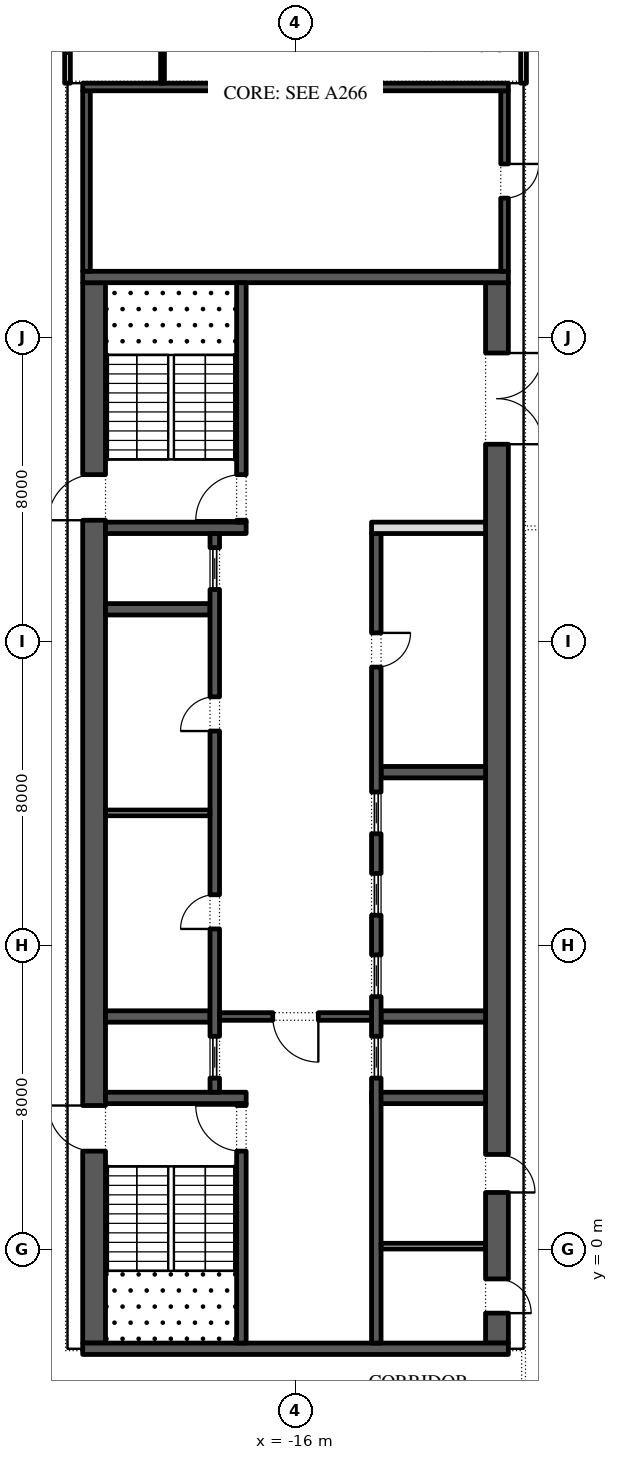
"""IFC4 building model, lengths in metres.
Left out: names, types, materials, properties, quantities, classifications, styles, units other than length and angle.
Written with IfcOpenShell. Run it as: python <this file> out.ifc"""

import sys

from ifc_helpers import new_model, si_unit, direction, frame, frame_2d, origin, place, context, subcontext, project, spatial, rectangle, extrude, element, fill, save


model = new_model("IFC4")
c1 = context("Model", 3, precision=1e-05, world=origin(), true_north=direction((0.0, 1.0)))
c2 = subcontext(c1, "Body", "Model", "MODEL_VIEW")
j1 = project(units=[si_unit("LENGTHUNIT", "METRE"), si_unit("PLANEANGLEUNIT", "RADIAN")], contexts=[c1])
p1 = place(None, origin())
s1 = spatial("IfcSite", under=j1, at=p1, CompositionType="ELEMENT")
p2 = place(p1, origin())
s2 = spatial("IfcBuilding", under=s1, at=p2, CompositionType="ELEMENT")
p3 = place(p2, frame((0.0, 0.0, 289.2)))
s3 = spatial("IfcBuildingStorey", under=s2, at=p3, CompositionType="ELEMENT", Elevation=289.2)
p4 = place(p3, frame((-21.3, -2.45, 0.0), z_axis=(0.0, 0.0, 1.0), x_axis=(0.0, 1.0, 0.0)))
e1 = element("IfcWall", 1, at=p4, inside=s3, PredefinedType="SHEAR", context=c2, shape_type="SweptSolid", body=[
    extrude(rectangle(XDim=27.9, YDim=0.6, at=frame_2d((13.95, 0.0))), origin(), (0.0, 0.0, 1.0), 3.95),
])
p5 = place(p4, frame((5.05, 0.0, 0.0)))
e2 = element("IfcOpeningElement", 2, at=p5, cuts=e1, PredefinedType="OPENING", context=c2, shape_type="SweptSolid", body=[
    extrude(rectangle(XDim=1.2, YDim=2.1, at=frame_2d((0.6, 1.05))), frame((0.0, 0.31, 0.0), z_axis=(0.0, -1.0, 0.0), x_axis=(1.0, 0.0, 0.0)), (0.0, 0.0, 1.0), 0.62),
])
p6 = place(p4, frame((21.65, 0.0, 0.0)))
e3 = element("IfcOpeningElement", 3, at=p6, cuts=e1, PredefinedType="OPENING", context=c2, shape_type="SweptSolid", body=[
    extrude(rectangle(XDim=1.2, YDim=2.1, at=frame_2d((0.6, 1.05))), frame((0.0, 0.31, 0.0), z_axis=(0.0, -1.0, 0.0), x_axis=(1.0, 0.0, 0.0)), (0.0, 0.0, 1.0), 0.62),
])
p7 = place(p3, frame((-10.7, -2.45, 0.0), z_axis=(0.0, 0.0, 1.0), x_axis=(0.0, 1.0, 0.0)))
e4 = element("IfcWall", 4, at=p7, inside=s3, PredefinedType="SHEAR", context=c2, shape_type="SweptSolid", body=[
    extrude(rectangle(XDim=27.9, YDim=0.6, at=frame_2d((13.95, 0.0))), origin(), (0.0, 0.0, 1.0), 3.95),
])
p8 = place(p7, frame((23.65, 0.0, 0.0)))
e5 = element("IfcOpeningElement", 5, at=p8, cuts=e4, PredefinedType="OPENING", context=c2, shape_type="SweptSolid", body=[
    extrude(rectangle(XDim=2.4, YDim=2.1, at=frame_2d((1.2, 1.05))), frame((0.0, 0.31, 0.0), z_axis=(0.0, -1.0, 0.0), x_axis=(1.0, 0.0, 0.0)), (0.0, 0.0, 1.0), 0.62),
])
p9 = place(p7, frame((0.788, 0.0, 0.0)))
e6 = element("IfcOpeningElement", 6, at=p9, cuts=e4, PredefinedType="OPENING", context=c2, shape_type="SweptSolid", body=[
    extrude(rectangle(XDim=0.9, YDim=2.1, at=frame_2d((0.45, 1.05))), frame((0.0, 0.31, 0.0), z_axis=(0.0, -1.0, 0.0), x_axis=(1.0, 0.0, 0.0)), (0.0, 0.0, 1.0), 0.62),
])
p10 = place(p7, frame((3.962, 0.0, 0.0)))
e7 = element("IfcOpeningElement", 7, at=p10, cuts=e4, PredefinedType="OPENING", context=c2, shape_type="SweptSolid", body=[
    extrude(rectangle(XDim=1.0, YDim=2.1, at=frame_2d((0.5, 1.05))), frame((0.0, 0.31, 0.0), z_axis=(0.0, -1.0, 0.0), x_axis=(1.0, 0.0, 0.0)), (0.0, 0.0, 1.0), 0.62),
])
for number, where, z_axis, x_axis in (
    (8, (-21.6, -2.6, 0.0), (0.0, 0.0, 1.0), (1.0, 0.0, 0.0)),
    (9, (-21.6, 25.6, 0.0), (0.0, 0.0, 1.0), (1.0, 0.0, 0.0)),
):
    element("IfcWall", number, at=place(p3, frame(where, z_axis=z_axis, x_axis=x_axis)), inside=s3, PredefinedType="SHEAR", context=c2, shape_type="SweptSolid", body=[
        extrude(rectangle(XDim=11.2, YDim=0.3, at=frame_2d((5.6, 0.0))), origin(), (0.0, 0.0, 1.0), 3.95),
    ])
p11 = place(p3, frame((-21.0, 4.0, 0.0), z_axis=(0.0, 0.0, 1.0), x_axis=(1.0, 0.0, 0.0)))
e10 = element("IfcWall", 10, at=p11, inside=s3, PredefinedType="SHEAR", context=c2, shape_type="SweptSolid", body=[
    extrude(rectangle(XDim=3.7, YDim=0.3, at=frame_2d((1.85, 0.0))), origin(), (0.0, 0.0, 1.0), 3.95),
])
p12 = place(p3, frame((-17.425, -2.45, 0.0), z_axis=(0.0, 0.0, 1.0), x_axis=(0.0, 1.0, 0.0)))
e11 = element("IfcWall", 11, at=p12, inside=s3, PredefinedType="SHEAR", context=c2, shape_type="SweptSolid", body=[
    extrude(rectangle(XDim=6.3, YDim=0.25, at=frame_2d((3.15, 0.0))), origin(), (0.0, 0.0, 1.0), 3.95),
])
p13 = place(p12, frame((5.05, 0.0, 0.0)))
e12 = element("IfcOpeningElement", 12, at=p13, cuts=e11, PredefinedType="OPENING", context=c2, shape_type="SweptSolid", body=[
    extrude(rectangle(XDim=1.2, YDim=2.1, at=frame_2d((0.6, 1.05))), frame((0.0, 0.135, 0.0), z_axis=(0.0, -1.0, 0.0), x_axis=(1.0, 0.0, 0.0)), (0.0, 0.0, 1.0), 0.27),
])
p14 = place(p3, frame((-21.0, 19.0, 0.0), z_axis=(0.0, 0.0, 1.0), x_axis=(1.0, 0.0, 0.0)))
e13 = element("IfcWall", 13, at=p14, inside=s3, PredefinedType="SHEAR", context=c2, shape_type="SweptSolid", body=[
    extrude(rectangle(XDim=3.7, YDim=0.3, at=frame_2d((1.85, 0.0))), origin(), (0.0, 0.0, 1.0), 3.95),
])
p15 = place(p3, frame((-17.425, 19.15, 0.0), z_axis=(0.0, 0.0, 1.0), x_axis=(0.0, 1.0, 0.0)))
e14 = element("IfcWall", 14, at=p15, inside=s3, PredefinedType="SHEAR", context=c2, shape_type="SweptSolid", body=[
    extrude(rectangle(XDim=6.3, YDim=0.25, at=frame_2d((3.15, 0.0))), origin(), (0.0, 0.0, 1.0), 3.95),
])
p16 = place(p15, frame((0.05, 0.0, 0.0)))
e15 = element("IfcOpeningElement", 15, at=p16, cuts=e14, PredefinedType="OPENING", context=c2, shape_type="SweptSolid", body=[
    extrude(rectangle(XDim=1.2, YDim=2.1, at=frame_2d((0.6, 1.05))), frame((0.0, 0.135, 0.0), z_axis=(0.0, -1.0, 0.0), x_axis=(1.0, 0.0, 0.0)), (0.0, 0.0, 1.0), 0.27),
])
for number, where, z_axis, x_axis in (
    (16, (-21.0, 6.143, 0.0), (0.0, 0.0, 1.0), (1.0, 0.0, 0.0)),
    (17, (-21.0, 16.857, 0.0), (0.0, 0.0, 1.0), (1.0, 0.0, 0.0)),
):
    element("IfcWall", number, at=place(p3, frame(where, z_axis=z_axis, x_axis=x_axis)), inside=s3, PredefinedType="SHEAR", context=c2, shape_type="SweptSolid", body=[
        extrude(rectangle(XDim=2.75, YDim=0.3, at=frame_2d((1.375, 0.0))), origin(), (0.0, 0.0, 1.0), 3.95),
    ])
p17 = place(p3, frame((-18.125, 4.15, 0.0), z_axis=(0.0, 0.0, 1.0), x_axis=(0.0, 1.0, 0.0)))
e18 = element("IfcWall", 18, at=p17, inside=s3, PredefinedType="SHEAR", context=c2, shape_type="SweptSolid", body=[
    extrude(rectangle(XDim=14.7, YDim=0.25, at=frame_2d((7.35, 0.0))), origin(), (0.0, 0.0, 1.0), 3.95),
])
p18 = place(p17, frame((4.296, 0.0, 0.0)))
e19 = element("IfcOpeningElement", 19, at=p18, cuts=e18, PredefinedType="OPENING", context=c2, shape_type="SweptSolid", body=[
    extrude(rectangle(XDim=0.9, YDim=2.1, at=frame_2d((0.45, 1.05))), frame((0.0, 0.135, 0.0), z_axis=(0.0, -1.0, 0.0), x_axis=(1.0, 0.0, 0.0)), (0.0, 0.0, 1.0), 0.27),
])
p19 = place(p17, frame((9.504, 0.0, 0.0)))
e20 = element("IfcOpeningElement", 20, at=p19, cuts=e18, PredefinedType="OPENING", context=c2, shape_type="SweptSolid", body=[
    extrude(rectangle(XDim=0.9, YDim=2.1, at=frame_2d((0.45, 1.05))), frame((0.0, 0.135, 0.0), z_axis=(0.0, -1.0, 0.0), x_axis=(1.0, 0.0, 0.0)), (0.0, 0.0, 1.0), 0.27),
])
p20 = place(p17, frame((0.371, 0.0, 0.0)))
e21 = element("IfcOpeningElement", 21, at=p20, cuts=e18, PredefinedType="OPENING", context=c2, shape_type="SweptSolid", body=[
    extrude(rectangle(XDim=1.1, YDim=2.1, at=frame_2d((0.55, 1.05))), frame((0.0, 0.135, 0.0), z_axis=(0.0, -1.0, 0.0), x_axis=(1.0, 0.0, 0.0)), (0.0, 0.0, 1.0), 0.27),
])
p21 = place(p17, frame((13.229, 0.0, 0.0)))
e22 = element("IfcOpeningElement", 22, at=p21, cuts=e18, PredefinedType="OPENING", context=c2, shape_type="SweptSolid", body=[
    extrude(rectangle(XDim=1.1, YDim=2.1, at=frame_2d((0.55, 1.05))), frame((0.0, 0.135, 0.0), z_axis=(0.0, -1.0, 0.0), x_axis=(1.0, 0.0, 0.0)), (0.0, 0.0, 1.0), 0.27),
])
p22 = place(p3, frame((-21.0, 11.5, 0.0), z_axis=(0.0, 0.0, 1.0), x_axis=(1.0, 0.0, 0.0)))
e23 = element("IfcWall", 23, at=p22, inside=s3, PredefinedType="PARTITIONING", context=c2, shape_type="SweptSolid", body=[
    extrude(rectangle(XDim=2.75, YDim=0.15, at=frame_2d((1.375, 0.0))), origin(), (0.0, 0.0, 1.0), 3.95),
])
p23 = place(p3, frame((-14.0, 4.0, 0.0), z_axis=(0.0, 0.0, 1.0), x_axis=(1.0, 0.0, 0.0)))
e24 = element("IfcWall", 24, at=p23, inside=s3, PredefinedType="SHEAR", context=c2, shape_type="SweptSolid", body=[
    extrude(rectangle(XDim=3.0, YDim=0.3, at=frame_2d((1.5, 0.0))), origin(), (0.0, 0.0, 1.0), 3.95),
])
for number, where, z_axis, x_axis in (
    (25, (-13.75, 6.143, 0.0), (0.0, 0.0, 1.0), (1.0, 0.0, 0.0)),
    (26, (-13.75, 12.571, 0.0), (0.0, 0.0, 1.0), (1.0, 0.0, 0.0)),
):
    element("IfcWall", number, at=place(p3, frame(where, z_axis=z_axis, x_axis=x_axis)), inside=s3, PredefinedType="SHEAR", context=c2, shape_type="SweptSolid", body=[
        extrude(rectangle(XDim=2.75, YDim=0.3, at=frame_2d((1.375, 0.0))), origin(), (0.0, 0.0, 1.0), 3.95),
    ])
p24 = place(p3, frame((-13.875, -2.45, 0.0), z_axis=(0.0, 0.0, 1.0), x_axis=(0.0, 1.0, 0.0)))
e27 = element("IfcWall", 27, at=p24, inside=s3, PredefinedType="SHEAR", context=c2, shape_type="SweptSolid", body=[
    extrude(rectangle(XDim=21.3, YDim=0.25, at=frame_2d((10.65, 0.0))), origin(), (0.0, 0.0, 1.0), 3.95),
])
p25 = place(p24, frame((17.786, 0.0, 0.0)))
e28 = element("IfcOpeningElement", 28, at=p25, cuts=e27, PredefinedType="OPENING", context=c2, shape_type="SweptSolid", body=[
    extrude(rectangle(XDim=0.9, YDim=2.1, at=frame_2d((0.45, 1.05))), frame((0.0, 0.135, 0.0), z_axis=(0.0, -1.0, 0.0), x_axis=(1.0, 0.0, 0.0)), (0.0, 0.0, 1.0), 0.27),
])
p26 = place(p24, frame((6.971, 0.0, 0.0)))
e29 = element("IfcOpeningElement", 29, at=p26, cuts=e27, PredefinedType="OPENING", context=c2, shape_type="SweptSolid", body=[
    extrude(rectangle(XDim=1.1, YDim=2.1, at=frame_2d((0.55, 1.05))), frame((0.0, 0.135, 0.0), z_axis=(0.0, -1.0, 0.0), x_axis=(1.0, 0.0, 0.0)), (0.0, 0.0, 1.0), 0.27),
])
p27 = place(p24, frame((9.114, 0.0, 0.0)))
e30 = element("IfcOpeningElement", 30, at=p27, cuts=e27, PredefinedType="OPENING", context=c2, shape_type="SweptSolid", body=[
    extrude(rectangle(XDim=1.1, YDim=2.1, at=frame_2d((0.55, 1.05))), frame((0.0, 0.135, 0.0), z_axis=(0.0, -1.0, 0.0), x_axis=(1.0, 0.0, 0.0)), (0.0, 0.0, 1.0), 0.27),
])
p28 = place(p24, frame((11.257, 0.0, 0.0)))
e31 = element("IfcOpeningElement", 31, at=p28, cuts=e27, PredefinedType="OPENING", context=c2, shape_type="SweptSolid", body=[
    extrude(rectangle(XDim=1.1, YDim=2.1, at=frame_2d((0.55, 1.05))), frame((0.0, 0.135, 0.0), z_axis=(0.0, -1.0, 0.0), x_axis=(1.0, 0.0, 0.0)), (0.0, 0.0, 1.0), 0.27),
])
p29 = place(p24, frame((13.4, 0.0, 0.0)))
e32 = element("IfcOpeningElement", 32, at=p29, cuts=e27, PredefinedType="OPENING", context=c2, shape_type="SweptSolid", body=[
    extrude(rectangle(XDim=1.1, YDim=2.1, at=frame_2d((0.55, 1.05))), frame((0.0, 0.135, 0.0), z_axis=(0.0, -1.0, 0.0), x_axis=(1.0, 0.0, 0.0)), (0.0, 0.0, 1.0), 0.27),
])
p30 = place(p3, frame((-14.0, 19.0, 0.0), z_axis=(0.0, 0.0, 1.0), x_axis=(1.0, 0.0, 0.0)))
e33 = element("IfcWall", 33, at=p30, inside=s3, PredefinedType="PARTITIONING", context=c2, shape_type="SweptSolid", body=[
    extrude(rectangle(XDim=3.0, YDim=0.3, at=frame_2d((1.5, 0.0))), origin(), (0.0, 0.0, 1.0), 3.95),
])
p31 = place(p3, frame((-18.0, 6.143, 0.0), z_axis=(0.0, 0.0, 1.0), x_axis=(1.0, 0.0, 0.0)))
e34 = element("IfcWall", 34, at=p31, inside=s3, PredefinedType="SHEAR", context=c2, shape_type="SweptSolid", body=[
    extrude(rectangle(XDim=4.0, YDim=0.2, at=frame_2d((2.0, 0.0))), origin(), (0.0, 0.0, 1.0), 3.95),
])
p32 = place(p31, frame((1.4, 0.0, 0.0)))
e35 = element("IfcOpeningElement", 35, at=p32, cuts=e34, PredefinedType="OPENING", context=c2, shape_type="SweptSolid", body=[
    extrude(rectangle(XDim=1.2, YDim=2.1, at=frame_2d((0.6, 1.05))), frame((0.0, 0.11, 0.0), z_axis=(0.0, -1.0, 0.0), x_axis=(1.0, 0.0, 0.0)), (0.0, 0.0, 1.0), 0.22),
])
p33 = place(p3, frame((-13.75, 0.1, 0.0), z_axis=(0.0, 0.0, 1.0), x_axis=(1.0, 0.0, 0.0)))
e36 = element("IfcWall", 36, at=p33, inside=s3, PredefinedType="PARTITIONING", context=c2, shape_type="SweptSolid", body=[
    extrude(rectangle(XDim=2.75, YDim=0.15, at=frame_2d((1.375, 0.0))), origin(), (0.0, 0.0, 1.0), 3.95),
])
p34 = place(p3, frame((-21.5, 25.75, 0.0), z_axis=(0.0, 0.0, 1.0), x_axis=(0.0, 1.0, 0.0)))
e37 = element("IfcWall", 37, at=p34, inside=s3, PredefinedType="SHEAR", context=c2, shape_type="SweptSolid", body=[
    extrude(rectangle(XDim=4.75, YDim=0.2, at=frame_2d((2.375, 0.0))), origin(), (0.0, 0.0, 1.0), 3.95),
])
p35 = place(p3, frame((-10.5, 25.75, 0.0), z_axis=(0.0, 0.0, 1.0), x_axis=(0.0, 1.0, 0.0)))
e38 = element("IfcWall", 38, at=p35, inside=s3, PredefinedType="SHEAR", context=c2, shape_type="SweptSolid", body=[
    extrude(rectangle(XDim=4.75, YDim=0.2, at=frame_2d((2.375, 0.0))), origin(), (0.0, 0.0, 1.0), 3.95),
])
p36 = place(p35, frame((1.925, 0.0, 0.0)))
e39 = element("IfcOpeningElement", 39, at=p36, cuts=e38, PredefinedType="OPENING", context=c2, shape_type="SweptSolid", body=[
    extrude(rectangle(XDim=0.9, YDim=2.1, at=frame_2d((0.45, 1.05))), frame((0.0, 0.11, 0.0), z_axis=(0.0, -1.0, 0.0), x_axis=(1.0, 0.0, 0.0)), (0.0, 0.0, 1.0), 0.22),
])
p37 = place(p3, frame((-21.6, 30.6, 0.0), z_axis=(0.0, 0.0, 1.0), x_axis=(1.0, 0.0, 0.0)))
e40 = element("IfcWall", 40, at=p37, inside=s3, PredefinedType="SHEAR", context=c2, shape_type="SweptSolid", body=[
    extrude(rectangle(XDim=11.2, YDim=0.2, at=frame_2d((5.6, 0.0))), origin(), (0.0, 0.0, 1.0), 3.95),
])
p38 = place(p3, frame((-22.0, 32.425, 0.0), z_axis=(0.0, 0.0, 1.0), x_axis=(0.0, -1.0, 0.0)))
e41 = element("IfcWall", 41, at=p38, inside=s3, PredefinedType="PARTITIONING", context=c2, shape_type="SweptSolid", body=[
    extrude(rectangle(XDim=1.725, YDim=0.15, at=frame_2d((0.863, 0.0))), origin(), (0.0, 0.0, 1.0), 3.95),
])
p39 = place(p3, frame((-19.5, 41.95, 0.0), z_axis=(0.0, 0.0, 1.0), x_axis=(0.0, -1.0, 0.0)))
e42 = element("IfcWall", 42, at=p39, inside=s3, PredefinedType="PARTITIONING", context=c2, shape_type="SweptSolid", body=[
    extrude(rectangle(XDim=11.25, YDim=0.1, at=frame_2d((5.625, 0.0))), origin(), (0.0, 0.0, 1.0), 3.95),
])
p40 = place(p3, frame((-10.0, 30.7, 0.0), z_axis=(0.0, 0.0, 1.0), x_axis=(0.0, 1.0, 0.0)))
e43 = element("IfcWall", 43, at=p40, inside=s3, PredefinedType="PARTITIONING", context=c2, shape_type="SweptSolid", body=[
    extrude(rectangle(XDim=1.875, YDim=0.15, at=frame_2d((0.938, 0.0))), origin(), (0.0, 0.0, 1.0), 3.95),
])
p41 = place(p18, origin())
e44 = element("IfcDoor", 44, at=p41, inside=s3, OperationType="SINGLE_SWING_RIGHT", PredefinedType="DOOR", context=c2, shape_type="SweptSolid", body=[
    extrude(rectangle(XDim=0.9, YDim=2.1, at=frame_2d((0.45, 1.05))), frame((0.0, 0.125, 0.0), z_axis=(0.0, -1.0, 0.0), x_axis=(1.0, 0.0, 0.0)), (0.0, 0.0, 1.0), 0.05),
])
fill(e19, e44)
p42 = place(p19, origin())
e45 = element("IfcDoor", 45, at=p42, inside=s3, OperationType="SINGLE_SWING_RIGHT", PredefinedType="DOOR", context=c2, shape_type="SweptSolid", body=[
    extrude(rectangle(XDim=0.9, YDim=2.1, at=frame_2d((0.45, 1.05))), frame((0.0, 0.125, 0.0), z_axis=(0.0, -1.0, 0.0), x_axis=(1.0, 0.0, 0.0)), (0.0, 0.0, 1.0), 0.05),
])
fill(e20, e45)
p43 = place(p20, origin())
e46 = element("IfcDoor", 46, at=p43, inside=s3, OperationType="SLIDING_TO_LEFT", PredefinedType="DOOR", context=c2, shape_type="SweptSolid", body=[
    extrude(rectangle(XDim=1.1, YDim=2.1, at=frame_2d((0.55, 1.05))), frame((0.0, 0.025, 0.0), z_axis=(0.0, -1.0, 0.0), x_axis=(1.0, 0.0, 0.0)), (0.0, 0.0, 1.0), 0.05),
])
fill(e21, e46)
p44 = place(p21, origin())
e47 = element("IfcDoor", 47, at=p44, inside=s3, OperationType="SLIDING_TO_LEFT", PredefinedType="DOOR", context=c2, shape_type="SweptSolid", body=[
    extrude(rectangle(XDim=1.1, YDim=2.1, at=frame_2d((0.55, 1.05))), frame((0.0, 0.025, 0.0), z_axis=(0.0, -1.0, 0.0), x_axis=(1.0, 0.0, 0.0)), (0.0, 0.0, 1.0), 0.05),
])
fill(e22, e47)
p45 = place(p25, frame((0.9, -0.2, 0.0), z_axis=(0.0, 0.0, 1.0), x_axis=(-1.0, 0.0, 0.0)))
e48 = element("IfcDoor", 48, at=p45, inside=s3, OperationType="SINGLE_SWING_RIGHT", PredefinedType="DOOR", context=c2, shape_type="SweptSolid", body=[
    extrude(rectangle(XDim=0.9, YDim=2.1, at=frame_2d((0.45, 1.05))), frame((0.0, -0.075, 0.0), z_axis=(0.0, -1.0, 0.0), x_axis=(1.0, 0.0, 0.0)), (0.0, 0.0, 1.0), 0.05),
])
fill(e28, e48)
p46 = place(p26, origin())
e49 = element("IfcDoor", 49, at=p46, inside=s3, OperationType="SLIDING_TO_LEFT", PredefinedType="DOOR", context=c2, shape_type="SweptSolid", body=[
    extrude(rectangle(XDim=1.1, YDim=2.1, at=frame_2d((0.55, 1.05))), frame((0.0, 0.025, 0.0), z_axis=(0.0, -1.0, 0.0), x_axis=(1.0, 0.0, 0.0)), (0.0, 0.0, 1.0), 0.05),
])
fill(e29, e49)
p47 = place(p27, origin())
e50 = element("IfcDoor", 50, at=p47, inside=s3, OperationType="SLIDING_TO_LEFT", PredefinedType="DOOR", context=c2, shape_type="SweptSolid", body=[
    extrude(rectangle(XDim=1.1, YDim=2.1, at=frame_2d((0.55, 1.05))), frame((0.0, 0.025, 0.0), z_axis=(0.0, -1.0, 0.0), x_axis=(1.0, 0.0, 0.0)), (0.0, 0.0, 1.0), 0.05),
])
fill(e30, e50)
p48 = place(p28, origin())
e51 = element("IfcDoor", 51, at=p48, inside=s3, OperationType="SLIDING_TO_LEFT", PredefinedType="DOOR", context=c2, shape_type="SweptSolid", body=[
    extrude(rectangle(XDim=1.1, YDim=2.1, at=frame_2d((0.55, 1.05))), frame((0.0, 0.025, 0.0), z_axis=(0.0, -1.0, 0.0), x_axis=(1.0, 0.0, 0.0)), (0.0, 0.0, 1.0), 0.05),
])
fill(e31, e51)
p49 = place(p29, origin())
e52 = element("IfcDoor", 52, at=p49, inside=s3, OperationType="SLIDING_TO_LEFT", PredefinedType="DOOR", context=c2, shape_type="SweptSolid", body=[
    extrude(rectangle(XDim=1.1, YDim=2.1, at=frame_2d((0.55, 1.05))), frame((0.0, 0.025, 0.0), z_axis=(0.0, -1.0, 0.0), x_axis=(1.0, 0.0, 0.0)), (0.0, 0.0, 1.0), 0.05),
])
fill(e32, e52)
p50 = place(p32, frame((1.2, 0.0, 0.0), z_axis=(0.0, 0.0, 1.0), x_axis=(-1.0, 0.0, 0.0)))
e53 = element("IfcDoor", 53, at=p50, inside=s3, OperationType="SINGLE_SWING_RIGHT", PredefinedType="DOOR", context=c2, shape_type="SweptSolid", body=[
    extrude(rectangle(XDim=1.2, YDim=2.1, at=frame_2d((0.6, 1.05))), frame((0.0, 0.025, 0.0), z_axis=(0.0, -1.0, 0.0), x_axis=(1.0, 0.0, 0.0)), (0.0, 0.0, 1.0), 0.05),
])
fill(e35, e53)
p51 = place(p8, frame((2.4, 0.0, 0.0), z_axis=(0.0, 0.0, 1.0), x_axis=(-1.0, 0.0, 0.0)))
e54 = element("IfcDoor", 54, at=p51, inside=s3, OperationType="DOUBLE_DOOR_SINGLE_SWING", PredefinedType="DOOR", context=c2, shape_type="SweptSolid", body=[
    extrude(rectangle(XDim=2.4, YDim=2.1, at=frame_2d((1.2, 1.05))), frame((0.0, 0.025, 0.0), z_axis=(0.0, -1.0, 0.0), x_axis=(1.0, 0.0, 0.0)), (0.0, 0.0, 1.0), 0.05),
])
fill(e5, e54)
p52 = place(p13, origin())
e55 = element("IfcDoor", 55, at=p52, inside=s3, OperationType="SINGLE_SWING_LEFT", PredefinedType="DOOR", context=c2, shape_type="SweptSolid", body=[
    extrude(rectangle(XDim=1.2, YDim=2.1, at=frame_2d((0.6, 1.05))), frame((0.0, 0.025, 0.0), z_axis=(0.0, -1.0, 0.0), x_axis=(1.0, 0.0, 0.0)), (0.0, 0.0, 1.0), 0.05),
])
fill(e12, e55)
p53 = place(p5, origin())
e56 = element("IfcDoor", 56, at=p53, inside=s3, OperationType="SINGLE_SWING_LEFT", PredefinedType="DOOR", context=c2, shape_type="SweptSolid", body=[
    extrude(rectangle(XDim=1.2, YDim=2.1, at=frame_2d((0.6, 1.05))), frame((0.0, 0.025, 0.0), z_axis=(0.0, -1.0, 0.0), x_axis=(1.0, 0.0, 0.0)), (0.0, 0.0, 1.0), 0.05),
])
fill(e2, e56)
p54 = place(p16, origin())
e57 = element("IfcDoor", 57, at=p54, inside=s3, OperationType="SINGLE_SWING_RIGHT", PredefinedType="DOOR", context=c2, shape_type="SweptSolid", body=[
    extrude(rectangle(XDim=1.2, YDim=2.1, at=frame_2d((0.6, 1.05))), frame((0.0, 0.025, 0.0), z_axis=(0.0, -1.0, 0.0), x_axis=(1.0, 0.0, 0.0)), (0.0, 0.0, 1.0), 0.05),
])
fill(e15, e57)
p55 = place(p6, origin())
e58 = element("IfcDoor", 58, at=p55, inside=s3, OperationType="SINGLE_SWING_RIGHT", PredefinedType="DOOR", context=c2, shape_type="SweptSolid", body=[
    extrude(rectangle(XDim=1.2, YDim=2.1, at=frame_2d((0.6, 1.05))), frame((0.0, 0.025, 0.0), z_axis=(0.0, -1.0, 0.0), x_axis=(1.0, 0.0, 0.0)), (0.0, 0.0, 1.0), 0.05),
])
fill(e3, e58)
p56 = place(p9, frame((0.9, 0.55, 0.0), z_axis=(0.0, 0.0, 1.0), x_axis=(-1.0, 0.0, 0.0)))
e59 = element("IfcDoor", 59, at=p56, inside=s3, OperationType="SINGLE_SWING_LEFT", PredefinedType="DOOR", context=c2, shape_type="SweptSolid", body=[
    extrude(rectangle(XDim=0.9, YDim=2.1, at=frame_2d((0.45, 1.05))), frame((0.0, 0.3, 0.0), z_axis=(0.0, -1.0, 0.0), x_axis=(1.0, 0.0, 0.0)), (0.0, 0.0, 1.0), 0.05),
])
fill(e6, e59)
p57 = place(p10, frame((1.0, 0.55, 0.0), z_axis=(0.0, 0.0, 1.0), x_axis=(-1.0, 0.0, 0.0)))
e60 = element("IfcDoor", 60, at=p57, inside=s3, OperationType="SINGLE_SWING_LEFT", PredefinedType="DOOR", context=c2, shape_type="SweptSolid", body=[
    extrude(rectangle(XDim=1.0, YDim=2.1, at=frame_2d((0.5, 1.05))), frame((0.0, 0.3, 0.0), z_axis=(0.0, -1.0, 0.0), x_axis=(1.0, 0.0, 0.0)), (0.0, 0.0, 1.0), 0.05),
])
fill(e7, e60)
p58 = place(p36, frame((0.9, 0.15, 0.0), z_axis=(0.0, 0.0, 1.0), x_axis=(-1.0, 0.0, 0.0)))
e61 = element("IfcDoor", 61, at=p58, inside=s3, OperationType="SINGLE_SWING_RIGHT", PredefinedType="DOOR", context=c2, shape_type="SweptSolid", body=[
    extrude(rectangle(XDim=0.9, YDim=2.1, at=frame_2d((0.45, 1.05))), frame((0.0, 0.1, 0.0), z_axis=(0.0, -1.0, 0.0), x_axis=(1.0, 0.0, 0.0)), (0.0, 0.0, 1.0), 0.05),
])
fill(e39, e61)
save(model, sys.argv[1])
